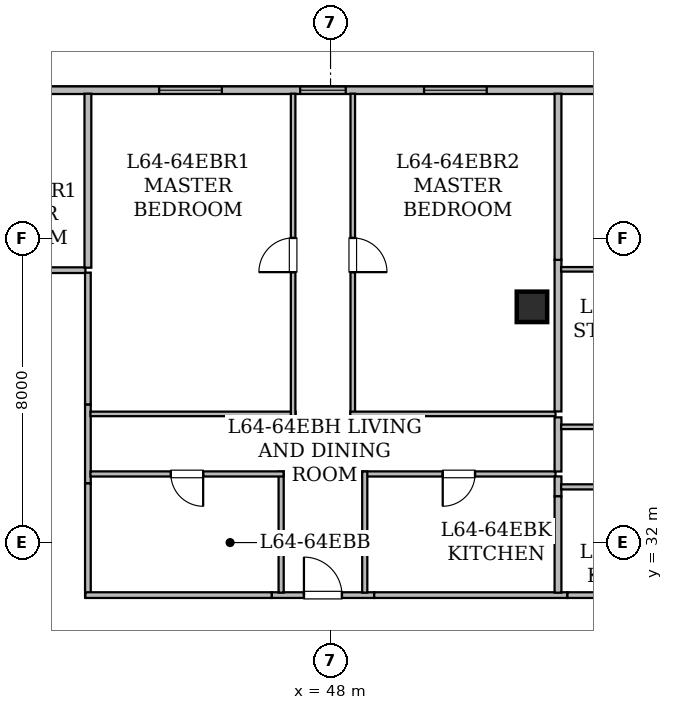
"""IFC4 building model, lengths in metres.
Left out: names, types, materials, properties, quantities, classifications, styles, units other than length and angle.
Written with IfcOpenShell. Run it as: python <this file> out.ifc"""

import sys

from ifc_helpers import new_model, si_unit, direction, frame, frame_2d, origin, origin_2d, place, context, subcontext, project, spatial, rectangle, hollow_rectangle, extrude, element, fill, save


model = new_model("IFC4")
c1 = context("Model", 3, precision=1e-05, world=origin(), true_north=direction((0.0, 1.0)))
c2 = subcontext(c1, "Body", "Model", "MODEL_VIEW")
j1 = project(units=[si_unit("LENGTHUNIT", "METRE"), si_unit("PLANEANGLEUNIT", "RADIAN")], contexts=[c1])
p1 = place(None, origin())
s1 = spatial("IfcSite", under=j1, at=p1, CompositionType="ELEMENT")
p2 = place(p1, origin())
s2 = spatial("IfcBuilding", under=s1, at=p2, CompositionType="ELEMENT")
p3 = place(p2, frame((0.0, 0.0, 250.05)))
s3 = spatial("IfcBuildingStorey", under=s2, at=p3, CompositionType="ELEMENT", Elevation=250.05)
for number, where, z_axis, x_axis in (
    (1, (51.083, 41.5, 0.0), (0.0, 0.0, 1.0), (1.0, 0.0, 0.0)),
    (2, (53.3, 38.2, 0.0), (0.0, 0.0, 1.0), (1.0, 0.0, 0.0)),
):
    element("IfcColumn", number, at=place(p3, frame(where, z_axis=z_axis, x_axis=x_axis)), inside=s3, PredefinedType="COLUMN", context=c2, shape_type="SweptSolid", body=[
        extrude(hollow_rectangle(XDim=0.8, YDim=0.8, WallThickness=0.04, at=origin_2d()), origin(), (0.0, 0.0, 1.0), 3.65),
    ])
p4 = place(p3, frame((24.302, 43.9, 0.0), z_axis=(0.0, 0.0, 1.0), x_axis=(1.0, 0.0, 0.0)))
e3 = element("IfcWall", 3, at=p4, inside=s3, PredefinedType="STANDARD", context=c2, shape_type="SweptSolid", body=[
    extrude(rectangle(XDim=41.457, YDim=0.2, at=frame_2d((20.729, 0.0))), origin(), (0.0, 0.0, 1.0), 3.43),
])
p5 = place(p4, frame((0.604, 0.0, 0.85)))
e4 = element("IfcOpeningElement", 4, at=p5, cuts=e3, PredefinedType="OPENING", context=c2, shape_type="SweptSolid", body=[
    extrude(rectangle(XDim=1.65, YDim=1.55, at=frame_2d((0.825, 0.775))), frame((0.0, 0.11, 0.0), z_axis=(0.0, -1.0, 0.0), x_axis=(1.0, 0.0, 0.0)), (0.0, 0.0, 1.0), 0.22),
])
p6 = place(p4, frame((9.098, 0.0, 0.85)))
e5 = element("IfcOpeningElement", 5, at=p6, cuts=e3, PredefinedType="OPENING", context=c2, shape_type="SweptSolid", body=[
    extrude(rectangle(XDim=1.65, YDim=1.55, at=frame_2d((0.825, 0.775))), frame((0.0, 0.11, 0.0), z_axis=(0.0, -1.0, 0.0), x_axis=(1.0, 0.0, 0.0)), (0.0, 0.0, 1.0), 0.22),
])
p7 = place(p4, frame((14.405, 0.0, 0.85)))
e6 = element("IfcOpeningElement", 6, at=p7, cuts=e3, PredefinedType="OPENING", context=c2, shape_type="SweptSolid", body=[
    extrude(rectangle(XDim=1.65, YDim=1.55, at=frame_2d((0.825, 0.775))), frame((0.0, 0.11, 0.0), z_axis=(0.0, -1.0, 0.0), x_axis=(1.0, 0.0, 0.0)), (0.0, 0.0, 1.0), 0.22),
])
p8 = place(p4, frame((22.898, 0.0, 0.8)))
e7 = element("IfcOpeningElement", 7, at=p8, cuts=e3, PredefinedType="OPENING", context=c2, shape_type="SweptSolid", body=[
    extrude(rectangle(XDim=1.2, YDim=1.5, at=frame_2d((0.6, 0.75))), frame((0.0, 0.11, 0.0), z_axis=(0.0, -1.0, 0.0), x_axis=(1.0, 0.0, 0.0)), (0.0, 0.0, 1.0), 0.22),
])
p9 = place(p4, frame((19.188, 0.0, 0.85)))
e8 = element("IfcOpeningElement", 8, at=p9, cuts=e3, PredefinedType="OPENING", context=c2, shape_type="SweptSolid", body=[
    extrude(rectangle(XDim=1.65, YDim=1.55, at=frame_2d((0.825, 0.775))), frame((0.0, 0.11, 0.0), z_axis=(0.0, -1.0, 0.0), x_axis=(1.0, 0.0, 0.0)), (0.0, 0.0, 1.0), 0.22),
])
p10 = place(p4, frame((26.158, 0.0, 0.85)))
e9 = element("IfcOpeningElement", 9, at=p10, cuts=e3, PredefinedType="OPENING", context=c2, shape_type="SweptSolid", body=[
    extrude(rectangle(XDim=1.65, YDim=1.55, at=frame_2d((0.825, 0.775))), frame((0.0, 0.11, 0.0), z_axis=(0.0, -1.0, 0.0), x_axis=(1.0, 0.0, 0.0)), (0.0, 0.0, 1.0), 0.22),
])
p11 = place(p4, frame((32.408, 0.0, 0.85)))
e10 = element("IfcOpeningElement", 10, at=p11, cuts=e3, PredefinedType="OPENING", context=c2, shape_type="SweptSolid", body=[
    extrude(rectangle(XDim=1.65, YDim=1.55, at=frame_2d((0.825, 0.775))), frame((0.0, 0.11, 0.0), z_axis=(0.0, -1.0, 0.0), x_axis=(1.0, 0.0, 0.0)), (0.0, 0.0, 1.0), 0.22),
])
p12 = place(p3, frame((37.699, 39.165, 0.0), z_axis=(0.0, 0.0, 1.0), x_axis=(1.0, 0.0, 0.0)))
e11 = element("IfcWall", 11, at=p12, inside=s3, PredefinedType="STANDARD", context=c2, shape_type="SweptSolid", body=[
    extrude(rectangle(XDim=3.851, YDim=0.15, at=frame_2d((1.926, 0.0))), origin(), (0.0, 0.0, 1.0), 2.725),
])
p13 = place(p3, frame((41.615, 35.632, 0.0), z_axis=(0.0, 0.0, 1.0), x_axis=(0.0, -1.0, 0.0)))
e12 = element("IfcWall", 12, at=p13, inside=s3, PredefinedType="STANDARD", context=c2, shape_type="SweptSolid", body=[
    extrude(rectangle(XDim=2.078, YDim=0.15, at=frame_2d((1.039, 0.0))), origin(), (0.0, 0.0, 1.0), 3.43),
])
p14 = place(p3, frame((46.451, 30.615, 0.0), z_axis=(0.0, 0.0, 1.0), x_axis=(1.0, 0.0, 0.0)))
e13 = element("IfcWall", 13, at=p14, inside=s3, PredefinedType="STANDARD", context=c2, shape_type="SweptSolid", body=[
    extrude(rectangle(XDim=2.698, YDim=0.15, at=frame_2d((1.349, 0.0))), origin(), (0.0, 0.0, 1.0), 3.43),
])
p15 = place(p14, frame((0.849, 0.0, 0.0)))
e14 = element("IfcOpeningElement", 14, at=p15, cuts=e13, PredefinedType="OPENING", context=c2, shape_type="SweptSolid", body=[
    extrude(rectangle(XDim=1.0, YDim=2.15, at=frame_2d((0.5, 1.075))), frame((0.0, 0.085, 0.0), z_axis=(0.0, -1.0, 0.0), x_axis=(1.0, 0.0, 0.0)), (0.0, 0.0, 1.0), 0.17),
])
p16 = place(p3, frame((41.615, 33.554, 0.0), z_axis=(0.0, 0.0, 1.0), x_axis=(0.0, -1.0, 0.0)))
e15 = element("IfcWall", 15, at=p16, inside=s3, PredefinedType="STANDARD", context=c2, shape_type="SweptSolid", body=[
    extrude(rectangle(XDim=3.004, YDim=0.15, at=frame_2d((1.502, 0.0))), origin(), (0.0, 0.0, 1.0), 2.961),
])
p17 = place(p3, frame((41.55, 30.615, 0.0), z_axis=(0.0, 0.0, 1.0), x_axis=(1.0, 0.0, 0.0)))
e16 = element("IfcWall", 16, at=p17, inside=s3, PredefinedType="STANDARD", context=c2, shape_type="SweptSolid", body=[
    extrude(rectangle(XDim=4.901, YDim=0.15, at=frame_2d((2.45, 0.0))), origin(), (0.0, 0.0, 1.0), 3.43),
])
p18 = place(p3, frame((49.149, 30.615, 0.0), z_axis=(0.0, 0.0, 1.0), x_axis=(1.0, 0.0, 0.0)))
e17 = element("IfcWall", 17, at=p18, inside=s3, PredefinedType="STANDARD", context=c2, shape_type="SweptSolid", body=[
    extrude(rectangle(XDim=5.085, YDim=0.15, at=frame_2d((2.542, 0.0))), origin(), (0.0, 0.0, 1.0), 2.725),
])
p19 = place(p3, frame((41.615, 39.1, 0.0), z_axis=(0.0, 0.0, 1.0), x_axis=(0.0, -1.0, 0.0)))
e18 = element("IfcWall", 18, at=p19, inside=s3, PredefinedType="STANDARD", context=c2, shape_type="SweptSolid", body=[
    extrude(rectangle(XDim=3.468, YDim=0.15, at=frame_2d((1.734, 0.0))), origin(), (0.0, 0.0, 1.0), 2.725),
])
p20 = place(p3, frame((54.234, 30.615, 0.0), z_axis=(0.0, 0.0, 1.0), x_axis=(1.0, 0.0, 0.0)))
e19 = element("IfcWall", 19, at=p20, inside=s3, PredefinedType="STANDARD", context=c2, shape_type="SweptSolid", body=[
    extrude(rectangle(XDim=5.03, YDim=0.15, at=frame_2d((2.515, 0.0))), origin(), (0.0, 0.0, 1.0), 3.43),
])
p21 = place(p3, frame((41.615, 43.808, 0.0), z_axis=(0.0, 0.0, 1.0), x_axis=(0.0, -1.0, 0.0)))
e20 = element("IfcWall", 20, at=p21, inside=s3, PredefinedType="STANDARD", context=c2, shape_type="SweptSolid", body=[
    extrude(rectangle(XDim=4.578, YDim=0.18, at=frame_2d((2.289, 0.0))), origin(), (0.0, 0.0, 1.0), 2.887),
])
p22 = place(p3, frame((46.7, 30.68, 0.0), z_axis=(0.0, 0.0, 1.0), x_axis=(0.0, 1.0, 0.0)))
e21 = element("IfcWall", 21, at=p22, inside=s3, PredefinedType="PARTITIONING", context=c2, shape_type="SweptSolid", body=[
    extrude(rectangle(XDim=3.188, YDim=0.135, at=frame_2d((1.594, 0.0))), origin(), (0.0, 0.0, 1.0), 2.961),
])
p23 = place(p3, frame((46.765, 33.803, 0.0), z_axis=(0.0, 0.0, 1.0), x_axis=(-1.0, 0.0, 0.0)))
e22 = element("IfcWall", 22, at=p23, inside=s3, PredefinedType="PARTITIONING", context=c2, shape_type="SweptSolid", body=[
    extrude(rectangle(XDim=5.083, YDim=0.135, at=frame_2d((2.542, 0.0))), origin(), (0.0, 0.0, 1.0), 3.43),
])
p24 = place(p23, frame((2.117, 0.0, 0.0)))
e23 = element("IfcOpeningElement", 23, at=p24, cuts=e22, PredefinedType="OPENING", context=c2, shape_type="SweptSolid", body=[
    extrude(rectangle(XDim=0.85, YDim=2.1, at=frame_2d((0.425, 1.05))), frame((0.0, 0.077, 0.0), z_axis=(0.0, -1.0, 0.0), x_axis=(1.0, 0.0, 0.0)), (0.0, 0.0, 1.0), 0.155),
])
p25 = place(p3, frame((53.92, 33.803, 0.0), z_axis=(0.0, 0.0, 1.0), x_axis=(-1.0, 0.0, 0.0)))
e24 = element("IfcWall", 24, at=p25, inside=s3, PredefinedType="PARTITIONING", context=c2, shape_type="SweptSolid", body=[
    extrude(rectangle(XDim=5.085, YDim=0.135, at=frame_2d((2.542, 0.0))), origin(), (0.0, 0.0, 1.0), 2.725),
])
p26 = place(p25, frame((2.118, 0.0, 0.0)))
e25 = element("IfcOpeningElement", 25, at=p26, cuts=e24, PredefinedType="OPENING", context=c2, shape_type="SweptSolid", body=[
    extrude(rectangle(XDim=0.85, YDim=2.1, at=frame_2d((0.425, 1.05))), frame((0.0, 0.077, 0.0), z_axis=(0.0, -1.0, 0.0), x_axis=(1.0, 0.0, 0.0)), (0.0, 0.0, 1.0), 0.155),
])
p27 = place(p3, frame((48.9, 33.868, 0.0), z_axis=(0.0, 0.0, 1.0), x_axis=(0.0, -1.0, 0.0)))
e26 = element("IfcWall", 26, at=p27, inside=s3, PredefinedType="PARTITIONING", context=c2, shape_type="SweptSolid", body=[
    extrude(rectangle(XDim=3.188, YDim=0.135, at=frame_2d((1.594, 0.0))), origin(), (0.0, 0.0, 1.0), 2.961),
])
p28 = place(p3, frame((41.682, 35.383, 0.0), z_axis=(0.0, 0.0, 1.0), x_axis=(1.0, 0.0, 0.0)))
e27 = element("IfcWall", 27, at=p28, inside=s3, PredefinedType="PARTITIONING", context=c2, shape_type="SweptSolid", body=[
    extrude(rectangle(XDim=5.398, YDim=0.12, at=frame_2d((2.699, 0.0))), origin(), (0.0, 0.0, 1.0), 3.43),
])
p29 = place(p3, frame((47.015, 35.318, 0.0), z_axis=(0.0, 0.0, 1.0), x_axis=(0.0, 1.0, 0.0)))
e28 = element("IfcWall", 28, at=p29, inside=s3, PredefinedType="PARTITIONING", context=c2, shape_type="SweptSolid", body=[
    extrude(rectangle(XDim=8.49, YDim=0.12, at=frame_2d((4.245, 0.0))), origin(), (0.0, 0.0, 1.0), 2.725),
])
p30 = place(p29, frame((3.795, 0.0, 0.0)))
e29 = element("IfcOpeningElement", 29, at=p30, cuts=e28, PredefinedType="OPENING", context=c2, shape_type="SweptSolid", body=[
    extrude(rectangle(XDim=0.9, YDim=2.1, at=frame_2d((0.45, 1.05))), frame((0.0, 0.07, 0.0), z_axis=(0.0, -1.0, 0.0), x_axis=(1.0, 0.0, 0.0)), (0.0, 0.0, 1.0), 0.14),
])
p31 = place(p3, frame((48.585, 43.808, 0.0), z_axis=(0.0, 0.0, 1.0), x_axis=(0.0, -1.0, 0.0)))
e30 = element("IfcWall", 30, at=p31, inside=s3, PredefinedType="PARTITIONING", context=c2, shape_type="SweptSolid", body=[
    extrude(rectangle(XDim=8.49, YDim=0.12, at=frame_2d((4.245, 0.0))), origin(), (0.0, 0.0, 1.0), 2.725),
])
p32 = place(p31, frame((3.795, 0.0, 0.0)))
e31 = element("IfcOpeningElement", 31, at=p32, cuts=e30, PredefinedType="OPENING", context=c2, shape_type="SweptSolid", body=[
    extrude(rectangle(XDim=0.9, YDim=2.1, at=frame_2d((0.45, 1.05))), frame((0.0, 0.07, 0.0), z_axis=(0.0, -1.0, 0.0), x_axis=(1.0, 0.0, 0.0)), (0.0, 0.0, 1.0), 0.14),
])
p33 = place(p3, frame((48.52, 35.383, 0.0), z_axis=(0.0, 0.0, 1.0), x_axis=(1.0, 0.0, 0.0)))
e32 = element("IfcWall", 32, at=p33, inside=s3, PredefinedType="PARTITIONING", context=c2, shape_type="SweptSolid", body=[
    extrude(rectangle(XDim=5.4, YDim=0.12, at=frame_2d((2.7, 0.0))), origin(), (0.0, 0.0, 1.0), 2.725),
])
p34 = place(p3, frame((53.985, 35.292, 0.0), z_axis=(0.0, 0.0, 1.0), x_axis=(0.0, -1.0, 0.0)))
e33 = element("IfcWall", 33, at=p34, inside=s3, PredefinedType="STANDARD", context=c2, shape_type="SweptSolid", body=[
    extrude(rectangle(XDim=1.424, YDim=0.18, at=frame_2d((0.712, 0.0))), origin(), (0.0, 0.0, 1.0), 3.43),
])
p35 = place(p3, frame((53.985, 33.738, 0.0), z_axis=(0.0, 0.0, 1.0), x_axis=(0.0, -1.0, 0.0)))
e34 = element("IfcWall", 34, at=p35, inside=s3, PredefinedType="STANDARD", context=c2, shape_type="SweptSolid", body=[
    extrude(rectangle(XDim=0.524, YDim=0.18, at=frame_2d((0.262, 0.0))), origin(), (0.0, 0.0, 1.0), 2.961),
])
p36 = place(p3, frame((53.985, 33.214, 0.0), z_axis=(0.0, 0.0, 1.0), x_axis=(0.0, -1.0, 0.0)))
e35 = element("IfcWall", 35, at=p36, inside=s3, PredefinedType="STANDARD", context=c2, shape_type="SweptSolid", body=[
    extrude(rectangle(XDim=2.534, YDim=0.18, at=frame_2d((1.267, 0.0))), origin(), (0.0, 0.0, 1.0), 3.43),
])
p37 = place(p3, frame((53.985, 39.436, 0.0), z_axis=(0.0, 0.0, 1.0), x_axis=(0.0, -1.0, 0.0)))
e36 = element("IfcWall", 36, at=p37, inside=s3, PredefinedType="STANDARD", context=c2, shape_type="SweptSolid", body=[
    extrude(rectangle(XDim=3.988, YDim=0.18, at=frame_2d((1.994, 0.0))), origin(), (0.0, 0.0, 1.0), 2.725),
])
p38 = place(p3, frame((53.985, 43.808, 0.0), z_axis=(0.0, 0.0, 1.0), x_axis=(0.0, -1.0, 0.0)))
e37 = element("IfcWall", 37, at=p38, inside=s3, PredefinedType="STANDARD", context=c2, shape_type="SweptSolid", body=[
    extrude(rectangle(XDim=4.372, YDim=0.18, at=frame_2d((2.186, 0.0))), origin(), (0.0, 0.0, 1.0), 2.887),
])
p39 = place(p3, frame((59.578, 33.463, 0.0), z_axis=(0.0, 0.0, 1.0), x_axis=(-1.0, 0.0, 0.0)))
e38 = element("IfcWall", 38, at=p39, inside=s3, PredefinedType="PARTITIONING", context=c2, shape_type="SweptSolid", body=[
    extrude(rectangle(XDim=5.511, YDim=0.135, at=frame_2d((2.755, 0.0))), origin(), (0.0, 0.0, 1.0), 2.961),
])
p40 = place(p39, frame((2.331, 0.0, 0.0)))
e39 = element("IfcOpeningElement", 39, at=p40, cuts=e38, PredefinedType="OPENING", context=c2, shape_type="SweptSolid", body=[
    extrude(rectangle(XDim=0.85, YDim=2.1, at=frame_2d((0.425, 1.05))), frame((0.0, 0.077, 0.0), z_axis=(0.0, -1.0, 0.0), x_axis=(1.0, 0.0, 0.0)), (0.0, 0.0, 1.0), 0.155),
])
p41 = place(p3, frame((54.067, 35.043, 0.0), z_axis=(0.0, 0.0, 1.0), x_axis=(1.0, 0.0, 0.0)))
e40 = element("IfcWall", 40, at=p41, inside=s3, PredefinedType="PARTITIONING", context=c2, shape_type="SweptSolid", body=[
    extrude(rectangle(XDim=7.083, YDim=0.12, at=frame_2d((3.542, 0.0))), origin(), (0.0, 0.0, 1.0), 3.43),
])
p42 = place(p41, frame((3.091, 0.0, 0.0)))
e41 = element("IfcOpeningElement", 41, at=p42, cuts=e40, PredefinedType="OPENING", context=c2, shape_type="SweptSolid", body=[
    extrude(rectangle(XDim=0.9, YDim=2.1, at=frame_2d((0.45, 1.05))), frame((0.0, 0.07, 0.0), z_axis=(0.0, -1.0, 0.0), x_axis=(1.0, 0.0, 0.0)), (0.0, 0.0, 1.0), 0.14),
])
p43 = place(p3, frame((54.067, 39.187, 0.0), z_axis=(0.0, 0.0, 1.0), x_axis=(1.0, 0.0, 0.0)))
e42 = element("IfcWall", 42, at=p43, inside=s3, PredefinedType="PARTITIONING", context=c2, shape_type="SweptSolid", body=[
    extrude(rectangle(XDim=6.964, YDim=0.12, at=frame_2d((3.482, 0.0))), origin(), (0.0, 0.0, 1.0), 2.725),
])
p44 = place(p8, origin())
e43 = element("IfcWindow", 43, at=p44, inside=s3, PartitioningType="SINGLE_PANEL", PredefinedType="WINDOW", context=c2, shape_type="SweptSolid", body=[
    extrude(rectangle(XDim=1.2, YDim=1.5, at=frame_2d((0.6, 0.75))), frame((0.0, 0.03, 0.0), z_axis=(0.0, -1.0, 0.0), x_axis=(1.0, 0.0, 0.0)), (0.0, 0.0, 1.0), 0.06),
])
fill(e7, e43)
p45 = place(p9, origin())
e44 = element("IfcWindow", 44, at=p45, inside=s3, PartitioningType="SINGLE_PANEL", PredefinedType="WINDOW", context=c2, shape_type="SweptSolid", body=[
    extrude(rectangle(XDim=1.65, YDim=1.55, at=frame_2d((0.825, 0.775))), frame((0.0, 0.03, 0.0), z_axis=(0.0, -1.0, 0.0), x_axis=(1.0, 0.0, 0.0)), (0.0, 0.0, 1.0), 0.06),
])
fill(e8, e44)
p46 = place(p10, origin())
e45 = element("IfcWindow", 45, at=p46, inside=s3, PartitioningType="SINGLE_PANEL", PredefinedType="WINDOW", context=c2, shape_type="SweptSolid", body=[
    extrude(rectangle(XDim=1.65, YDim=1.55, at=frame_2d((0.825, 0.775))), frame((0.0, 0.03, 0.0), z_axis=(0.0, -1.0, 0.0), x_axis=(1.0, 0.0, 0.0)), (0.0, 0.0, 1.0), 0.06),
])
fill(e9, e45)
p47 = place(p15, origin())
e46 = element("IfcDoor", 46, at=p47, inside=s3, OperationType="SINGLE_SWING_LEFT", PredefinedType="DOOR", context=c2, shape_type="SweptSolid", body=[
    extrude(rectangle(XDim=1.0, YDim=2.15, at=frame_2d((0.5, 1.075))), frame((0.0, 0.025, 0.0), z_axis=(0.0, -1.0, 0.0), x_axis=(1.0, 0.0, 0.0)), (0.0, 0.0, 1.0), 0.05),
])
fill(e14, e46)
p48 = place(p24, origin())
e47 = element("IfcDoor", 47, at=p48, inside=s3, OperationType="SINGLE_SWING_LEFT", PredefinedType="DOOR", context=c2, shape_type="SweptSolid", body=[
    extrude(rectangle(XDim=0.85, YDim=2.1, at=frame_2d((0.425, 1.05))), frame((0.0, 0.025, 0.0), z_axis=(0.0, -1.0, 0.0), x_axis=(1.0, 0.0, 0.0)), (0.0, 0.0, 1.0), 0.05),
])
fill(e23, e47)
p49 = place(p26, origin())
e48 = element("IfcDoor", 48, at=p49, inside=s3, OperationType="SINGLE_SWING_RIGHT", PredefinedType="DOOR", context=c2, shape_type="SweptSolid", body=[
    extrude(rectangle(XDim=0.85, YDim=2.1, at=frame_2d((0.425, 1.05))), frame((0.0, 0.025, 0.0), z_axis=(0.0, -1.0, 0.0), x_axis=(1.0, 0.0, 0.0)), (0.0, 0.0, 1.0), 0.05),
])
fill(e25, e48)
p50 = place(p30, origin())
e49 = element("IfcDoor", 49, at=p50, inside=s3, OperationType="SINGLE_SWING_LEFT", PredefinedType="DOOR", context=c2, shape_type="SweptSolid", body=[
    extrude(rectangle(XDim=0.9, YDim=2.1, at=frame_2d((0.45, 1.05))), frame((0.0, 0.025, 0.0), z_axis=(0.0, -1.0, 0.0), x_axis=(1.0, 0.0, 0.0)), (0.0, 0.0, 1.0), 0.05),
])
fill(e29, e49)
p51 = place(p32, origin())
e50 = element("IfcDoor", 50, at=p51, inside=s3, OperationType="SINGLE_SWING_RIGHT", PredefinedType="DOOR", context=c2, shape_type="SweptSolid", body=[
    extrude(rectangle(XDim=0.9, YDim=2.1, at=frame_2d((0.45, 1.05))), frame((0.0, 0.025, 0.0), z_axis=(0.0, -1.0, 0.0), x_axis=(1.0, 0.0, 0.0)), (0.0, 0.0, 1.0), 0.05),
])
fill(e31, e50)
save(model, sys.argv[1])
